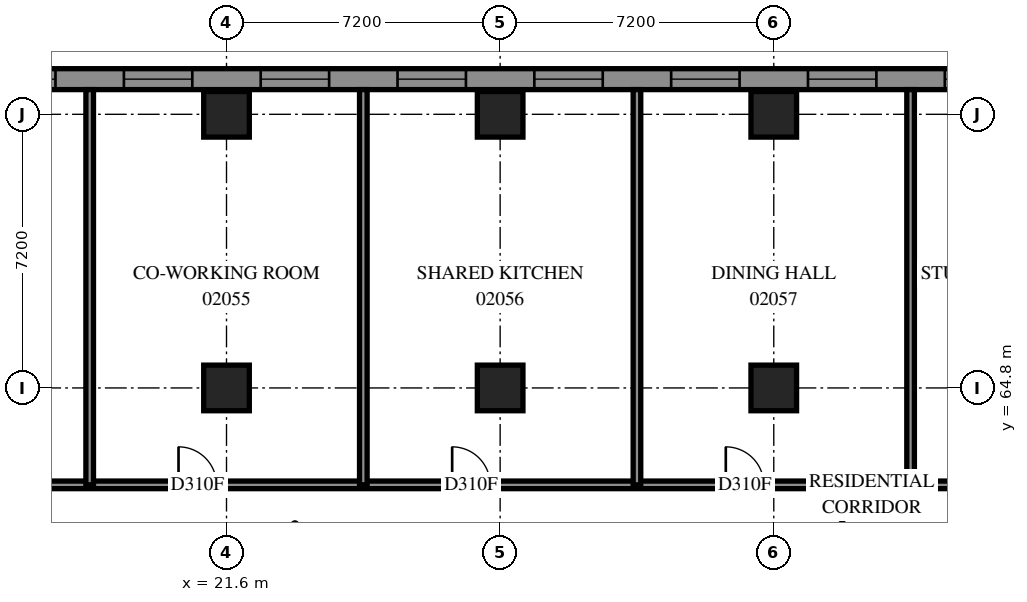
"""IFC4 building model, lengths in metres.
Left out: names, types, materials, properties, quantities, classifications, styles, units other than length and angle.
Written with IfcOpenShell. Run it as: python <this file> out.ifc"""

import sys

from ifc_helpers import new_model, si_unit, direction, frame, frame_2d, origin, origin_2d, place, context, subcontext, project, spatial, polyline, rectangle, outline, extrude, element, fill, save


model = new_model("IFC4")
c1 = context("Model", 3, precision=1e-05, world=origin(), true_north=direction((0.0, 1.0)))
c2 = subcontext(c1, "Body", "Model", "MODEL_VIEW")
j1 = project(units=[si_unit("LENGTHUNIT", "METRE"), si_unit("PLANEANGLEUNIT", "RADIAN")], contexts=[c1])
p1 = place(None, origin())
s1 = spatial("IfcSite", under=j1, at=p1, CompositionType="ELEMENT")
p2 = place(p1, origin())
s2 = spatial("IfcBuilding", under=s1, at=p2, CompositionType="ELEMENT")
p3 = place(p2, frame((0.0, 0.0, 10.2)))
s3 = spatial("IfcBuildingStorey", under=s2, at=p3, CompositionType="ELEMENT", Elevation=10.2)
for number, where, z_axis, x_axis in (
    (1, (21.6, 64.8, 0.0), (0.0, 0.0, 1.0), (1.0, 0.0, 0.0)),
    (2, (21.6, 72.0, 0.0), (0.0, 0.0, 1.0), (1.0, 0.0, 0.0)),
    (3, (28.8, 64.8, 0.0), (0.0, 0.0, 1.0), (1.0, 0.0, 0.0)),
    (4, (28.8, 72.0, 0.0), (0.0, 0.0, 1.0), (1.0, 0.0, 0.0)),
    (5, (36.0, 64.8, 0.0), (0.0, 0.0, 1.0), (1.0, 0.0, 0.0)),
    (6, (36.0, 72.0, 0.0), (0.0, 0.0, 1.0), (1.0, 0.0, 0.0)),
):
    element("IfcColumn", number, at=place(p3, frame(where, z_axis=z_axis, x_axis=x_axis)), inside=s3, PredefinedType="COLUMN", context=c2, shape_type="SweptSolid", body=[
        extrude(rectangle(XDim=1.2, YDim=1.2, at=origin_2d()), origin(), (0.0, 0.0, 1.0), 3.8),
    ])
p4 = place(p3, frame((79.583, 72.925, 0.0), z_axis=(0.0, 0.0, 1.0), x_axis=(-1.0, 0.0, 0.0)))
e7 = element("IfcWall", 7, at=p4, inside=s3, PredefinedType="SOLIDWALL", context=c2, shape_type="SweptSolid", body=[
    extrude(outline(polyline([(-0.114, -0.275), (79.583, -0.275), (79.033, 0.275), (0.114, 0.275), (-0.114, -0.275)])), origin(), (0.0, 0.0, 1.0), 3.8),
])
p5 = place(p4, frame((1.249, 0.0, 0.7)))
e8 = element("IfcOpeningElement", 8, at=p5, cuts=e7, PredefinedType="OPENING", context=c2, shape_type="SweptSolid", body=[
    extrude(rectangle(XDim=1.8, YDim=2.6, at=frame_2d((0.9, 1.3))), frame((0.0, 0.285, 0.0), z_axis=(0.0, -1.0, 0.0), x_axis=(1.0, 0.0, 0.0)), (0.0, 0.0, 1.0), 0.57),
])
p6 = place(p4, frame((4.883, 0.0, 0.7)))
e9 = element("IfcOpeningElement", 9, at=p6, cuts=e7, PredefinedType="OPENING", context=c2, shape_type="SweptSolid", body=[
    extrude(rectangle(XDim=1.8, YDim=2.6, at=frame_2d((0.9, 1.3))), frame((0.0, 0.285, 0.0), z_axis=(0.0, -1.0, 0.0), x_axis=(1.0, 0.0, 0.0)), (0.0, 0.0, 1.0), 0.57),
])
p7 = place(p4, frame((8.483, 0.0, 0.7)))
e10 = element("IfcOpeningElement", 10, at=p7, cuts=e7, PredefinedType="OPENING", context=c2, shape_type="SweptSolid", body=[
    extrude(rectangle(XDim=1.8, YDim=2.6, at=frame_2d((0.9, 1.3))), frame((0.0, 0.285, 0.0), z_axis=(0.0, -1.0, 0.0), x_axis=(1.0, 0.0, 0.0)), (0.0, 0.0, 1.0), 0.57),
])
p8 = place(p4, frame((12.083, 0.0, 0.7)))
e11 = element("IfcOpeningElement", 11, at=p8, cuts=e7, PredefinedType="OPENING", context=c2, shape_type="SweptSolid", body=[
    extrude(rectangle(XDim=1.8, YDim=2.6, at=frame_2d((0.9, 1.3))), frame((0.0, 0.285, 0.0), z_axis=(0.0, -1.0, 0.0), x_axis=(1.0, 0.0, 0.0)), (0.0, 0.0, 1.0), 0.57),
])
p9 = place(p4, frame((15.683, 0.0, 0.7)))
e12 = element("IfcOpeningElement", 12, at=p9, cuts=e7, PredefinedType="OPENING", context=c2, shape_type="SweptSolid", body=[
    extrude(rectangle(XDim=1.8, YDim=2.6, at=frame_2d((0.9, 1.3))), frame((0.0, 0.285, 0.0), z_axis=(0.0, -1.0, 0.0), x_axis=(1.0, 0.0, 0.0)), (0.0, 0.0, 1.0), 0.57),
])
p10 = place(p4, frame((19.283, 0.0, 0.7)))
e13 = element("IfcOpeningElement", 13, at=p10, cuts=e7, PredefinedType="OPENING", context=c2, shape_type="SweptSolid", body=[
    extrude(rectangle(XDim=1.8, YDim=2.6, at=frame_2d((0.9, 1.3))), frame((0.0, 0.285, 0.0), z_axis=(0.0, -1.0, 0.0), x_axis=(1.0, 0.0, 0.0)), (0.0, 0.0, 1.0), 0.57),
])
p11 = place(p4, frame((22.883, 0.0, 0.7)))
e14 = element("IfcOpeningElement", 14, at=p11, cuts=e7, PredefinedType="OPENING", context=c2, shape_type="SweptSolid", body=[
    extrude(rectangle(XDim=1.8, YDim=2.6, at=frame_2d((0.9, 1.3))), frame((0.0, 0.285, 0.0), z_axis=(0.0, -1.0, 0.0), x_axis=(1.0, 0.0, 0.0)), (0.0, 0.0, 1.0), 0.57),
])
p12 = place(p4, frame((26.483, 0.0, 0.7)))
e15 = element("IfcOpeningElement", 15, at=p12, cuts=e7, PredefinedType="OPENING", context=c2, shape_type="SweptSolid", body=[
    extrude(rectangle(XDim=1.8, YDim=2.6, at=frame_2d((0.9, 1.3))), frame((0.0, 0.285, 0.0), z_axis=(0.0, -1.0, 0.0), x_axis=(1.0, 0.0, 0.0)), (0.0, 0.0, 1.0), 0.57),
])
p13 = place(p4, frame((30.083, 0.0, 0.7)))
e16 = element("IfcOpeningElement", 16, at=p13, cuts=e7, PredefinedType="OPENING", context=c2, shape_type="SweptSolid", body=[
    extrude(rectangle(XDim=1.8, YDim=2.6, at=frame_2d((0.9, 1.3))), frame((0.0, 0.285, 0.0), z_axis=(0.0, -1.0, 0.0), x_axis=(1.0, 0.0, 0.0)), (0.0, 0.0, 1.0), 0.57),
])
p14 = place(p4, frame((33.683, 0.0, 0.7)))
e17 = element("IfcOpeningElement", 17, at=p14, cuts=e7, PredefinedType="OPENING", context=c2, shape_type="SweptSolid", body=[
    extrude(rectangle(XDim=1.8, YDim=2.6, at=frame_2d((0.9, 1.3))), frame((0.0, 0.285, 0.0), z_axis=(0.0, -1.0, 0.0), x_axis=(1.0, 0.0, 0.0)), (0.0, 0.0, 1.0), 0.57),
])
p15 = place(p4, frame((37.283, 0.0, 0.7)))
e18 = element("IfcOpeningElement", 18, at=p15, cuts=e7, PredefinedType="OPENING", context=c2, shape_type="SweptSolid", body=[
    extrude(rectangle(XDim=1.8, YDim=2.6, at=frame_2d((0.9, 1.3))), frame((0.0, 0.285, 0.0), z_axis=(0.0, -1.0, 0.0), x_axis=(1.0, 0.0, 0.0)), (0.0, 0.0, 1.0), 0.57),
])
p16 = place(p4, frame((40.883, 0.0, 0.7)))
e19 = element("IfcOpeningElement", 19, at=p16, cuts=e7, PredefinedType="OPENING", context=c2, shape_type="SweptSolid", body=[
    extrude(rectangle(XDim=1.8, YDim=2.6, at=frame_2d((0.9, 1.3))), frame((0.0, 0.285, 0.0), z_axis=(0.0, -1.0, 0.0), x_axis=(1.0, 0.0, 0.0)), (0.0, 0.0, 1.0), 0.57),
])
p17 = place(p4, frame((44.483, 0.0, 0.7)))
e20 = element("IfcOpeningElement", 20, at=p17, cuts=e7, PredefinedType="OPENING", context=c2, shape_type="SweptSolid", body=[
    extrude(rectangle(XDim=1.8, YDim=2.6, at=frame_2d((0.9, 1.3))), frame((0.0, 0.285, 0.0), z_axis=(0.0, -1.0, 0.0), x_axis=(1.0, 0.0, 0.0)), (0.0, 0.0, 1.0), 0.57),
])
p18 = place(p4, frame((48.083, 0.0, 0.7)))
e21 = element("IfcOpeningElement", 21, at=p18, cuts=e7, PredefinedType="OPENING", context=c2, shape_type="SweptSolid", body=[
    extrude(rectangle(XDim=1.8, YDim=2.6, at=frame_2d((0.9, 1.3))), frame((0.0, 0.285, 0.0), z_axis=(0.0, -1.0, 0.0), x_axis=(1.0, 0.0, 0.0)), (0.0, 0.0, 1.0), 0.57),
])
p19 = place(p4, frame((51.683, 0.0, 0.7)))
e22 = element("IfcOpeningElement", 22, at=p19, cuts=e7, PredefinedType="OPENING", context=c2, shape_type="SweptSolid", body=[
    extrude(rectangle(XDim=1.8, YDim=2.6, at=frame_2d((0.9, 1.3))), frame((0.0, 0.285, 0.0), z_axis=(0.0, -1.0, 0.0), x_axis=(1.0, 0.0, 0.0)), (0.0, 0.0, 1.0), 0.57),
])
p20 = place(p4, frame((55.283, 0.0, 0.7)))
e23 = element("IfcOpeningElement", 23, at=p20, cuts=e7, PredefinedType="OPENING", context=c2, shape_type="SweptSolid", body=[
    extrude(rectangle(XDim=1.8, YDim=2.6, at=frame_2d((0.9, 1.3))), frame((0.0, 0.285, 0.0), z_axis=(0.0, -1.0, 0.0), x_axis=(1.0, 0.0, 0.0)), (0.0, 0.0, 1.0), 0.57),
])
p21 = place(p4, frame((58.883, 0.0, 0.7)))
e24 = element("IfcOpeningElement", 24, at=p21, cuts=e7, PredefinedType="OPENING", context=c2, shape_type="SweptSolid", body=[
    extrude(rectangle(XDim=1.8, YDim=2.6, at=frame_2d((0.9, 1.3))), frame((0.0, 0.285, 0.0), z_axis=(0.0, -1.0, 0.0), x_axis=(1.0, 0.0, 0.0)), (0.0, 0.0, 1.0), 0.57),
])
p22 = place(p4, frame((62.483, 0.0, 0.7)))
e25 = element("IfcOpeningElement", 25, at=p22, cuts=e7, PredefinedType="OPENING", context=c2, shape_type="SweptSolid", body=[
    extrude(rectangle(XDim=1.8, YDim=2.6, at=frame_2d((0.9, 1.3))), frame((0.0, 0.285, 0.0), z_axis=(0.0, -1.0, 0.0), x_axis=(1.0, 0.0, 0.0)), (0.0, 0.0, 1.0), 0.57),
])
p23 = place(p4, frame((66.083, 0.0, 0.7)))
e26 = element("IfcOpeningElement", 26, at=p23, cuts=e7, PredefinedType="OPENING", context=c2, shape_type="SweptSolid", body=[
    extrude(rectangle(XDim=1.8, YDim=2.6, at=frame_2d((0.9, 1.3))), frame((0.0, 0.285, 0.0), z_axis=(0.0, -1.0, 0.0), x_axis=(1.0, 0.0, 0.0)), (0.0, 0.0, 1.0), 0.57),
])
p24 = place(p4, frame((69.683, 0.0, 0.7)))
e27 = element("IfcOpeningElement", 27, at=p24, cuts=e7, PredefinedType="OPENING", context=c2, shape_type="SweptSolid", body=[
    extrude(rectangle(XDim=1.8, YDim=2.6, at=frame_2d((0.9, 1.3))), frame((0.0, 0.285, 0.0), z_axis=(0.0, -1.0, 0.0), x_axis=(1.0, 0.0, 0.0)), (0.0, 0.0, 1.0), 0.57),
])
p25 = place(p4, frame((73.683, 0.0, 0.7)))
e28 = element("IfcOpeningElement", 28, at=p25, cuts=e7, PredefinedType="OPENING", context=c2, shape_type="SweptSolid", body=[
    extrude(rectangle(XDim=1.8, YDim=2.6, at=frame_2d((0.9, 1.3))), frame((0.0, 0.285, 0.0), z_axis=(0.0, -1.0, 0.0), x_axis=(1.0, 0.0, 0.0)), (0.0, 0.0, 1.0), 0.57),
])
p26 = place(p4, frame((76.508, 0.0, 0.7)))
e29 = element("IfcOpeningElement", 29, at=p26, cuts=e7, PredefinedType="OPENING", context=c2, shape_type="SweptSolid", body=[
    extrude(rectangle(XDim=1.8, YDim=2.6, at=frame_2d((0.9, 1.3))), frame((0.0, 0.285, 0.0), z_axis=(0.0, -1.0, 0.0), x_axis=(1.0, 0.0, 0.0)), (0.0, 0.0, 1.0), 0.57),
])
p27 = place(p3, frame((0.002, 62.25, 0.0), z_axis=(0.0, 0.0, 1.0), x_axis=(1.0, 0.0, 0.0)))
e30 = element("IfcWall", 30, at=p27, inside=s3, PredefinedType="PARTITIONING", context=c2, shape_type="SweptSolid", body=[
    extrude(rectangle(XDim=54.498, YDim=0.2, at=frame_2d((27.249, 0.0))), origin(), (0.0, 0.0, 1.0), 3.8),
])
p28 = place(p27, frame((8.667, 0.0, 0.0)))
e31 = element("IfcOpeningElement", 31, at=p28, cuts=e30, PredefinedType="OPENING", context=c2, shape_type="SweptSolid", body=[
    extrude(rectangle(XDim=1.0, YDim=2.1, at=frame_2d((0.5, 1.05))), frame((0.0, 0.11, 0.0), z_axis=(0.0, -1.0, 0.0), x_axis=(1.0, 0.0, 0.0)), (0.0, 0.0, 1.0), 0.22),
])
p29 = place(p27, frame((13.136, 0.0, 0.0)))
e32 = element("IfcOpeningElement", 32, at=p29, cuts=e30, PredefinedType="OPENING", context=c2, shape_type="SweptSolid", body=[
    extrude(rectangle(XDim=1.0, YDim=2.1, at=frame_2d((0.5, 1.05))), frame((0.0, 0.11, 0.0), z_axis=(0.0, -1.0, 0.0), x_axis=(1.0, 0.0, 0.0)), (0.0, 0.0, 1.0), 0.22),
])
p30 = place(p27, frame((20.335, 0.0, 0.0)))
e33 = element("IfcOpeningElement", 33, at=p30, cuts=e30, PredefinedType="OPENING", context=c2, shape_type="SweptSolid", body=[
    extrude(rectangle(XDim=1.0, YDim=2.1, at=frame_2d((0.5, 1.05))), frame((0.0, 0.11, 0.0), z_axis=(0.0, -1.0, 0.0), x_axis=(1.0, 0.0, 0.0)), (0.0, 0.0, 1.0), 0.22),
])
p31 = place(p27, frame((27.535, 0.0, 0.0)))
e34 = element("IfcOpeningElement", 34, at=p31, cuts=e30, PredefinedType="OPENING", context=c2, shape_type="SweptSolid", body=[
    extrude(rectangle(XDim=1.0, YDim=2.1, at=frame_2d((0.5, 1.05))), frame((0.0, 0.11, 0.0), z_axis=(0.0, -1.0, 0.0), x_axis=(1.0, 0.0, 0.0)), (0.0, 0.0, 1.0), 0.22),
])
p32 = place(p27, frame((34.736, 0.0, 0.0)))
e35 = element("IfcOpeningElement", 35, at=p32, cuts=e30, PredefinedType="OPENING", context=c2, shape_type="SweptSolid", body=[
    extrude(rectangle(XDim=1.0, YDim=2.1, at=frame_2d((0.5, 1.05))), frame((0.0, 0.11, 0.0), z_axis=(0.0, -1.0, 0.0), x_axis=(1.0, 0.0, 0.0)), (0.0, 0.0, 1.0), 0.22),
])
p33 = place(p27, frame((41.935, 0.0, 0.0)))
e36 = element("IfcOpeningElement", 36, at=p33, cuts=e30, PredefinedType="OPENING", context=c2, shape_type="SweptSolid", body=[
    extrude(rectangle(XDim=1.0, YDim=2.1, at=frame_2d((0.5, 1.05))), frame((0.0, 0.11, 0.0), z_axis=(0.0, -1.0, 0.0), x_axis=(1.0, 0.0, 0.0)), (0.0, 0.0, 1.0), 0.22),
])
p34 = place(p27, frame((49.136, 0.0, 0.0)))
e37 = element("IfcOpeningElement", 37, at=p34, cuts=e30, PredefinedType="OPENING", context=c2, shape_type="SweptSolid", body=[
    extrude(rectangle(XDim=1.0, YDim=2.1, at=frame_2d((0.5, 1.05))), frame((0.0, 0.11, 0.0), z_axis=(0.0, -1.0, 0.0), x_axis=(1.0, 0.0, 0.0)), (0.0, 0.0, 1.0), 0.22),
])
p35 = place(p27, frame((4.799, 0.0, 0.0)))
e38 = element("IfcOpeningElement", 38, at=p35, cuts=e30, PredefinedType="OPENING", context=c2, shape_type="SweptSolid", body=[
    extrude(rectangle(XDim=1.0, YDim=2.1, at=frame_2d((0.5, 1.05))), frame((0.0, 0.11, 0.0), z_axis=(0.0, -1.0, 0.0), x_axis=(1.0, 0.0, 0.0)), (0.0, 0.0, 1.0), 0.22),
])
for number, where, z_axis, x_axis in (
    (39, (18.0, 62.25, 0.0), (0.0, 0.0, 1.0), (0.0, 1.0, 0.0)),
    (40, (25.2, 62.25, 0.0), (0.0, 0.0, 1.0), (0.0, 1.0, 0.0)),
    (41, (32.4, 62.25, 0.0), (0.0, 0.0, 1.0), (0.0, 1.0, 0.0)),
    (42, (39.6, 62.25, 0.0), (0.0, 0.0, 1.0), (0.0, 1.0, 0.0)),
):
    element("IfcWall", number, at=place(p3, frame(where, z_axis=z_axis, x_axis=x_axis)), inside=s3, PredefinedType="PARTITIONING", context=c2, shape_type="SweptSolid", body=[
        extrude(rectangle(XDim=10.4, YDim=0.2, at=frame_2d((5.2, 0.0))), origin(), (0.0, 0.0, 1.0), 3.8),
    ])
p36 = place(p15, origin())
e43 = element("IfcWindow", 43, at=p36, inside=s3, PartitioningType="SINGLE_PANEL", PredefinedType="WINDOW", context=c2, shape_type="SweptSolid", body=[
    extrude(rectangle(XDim=1.8, YDim=2.6, at=frame_2d((0.9, 1.3))), frame((0.0, 0.155, 0.0), z_axis=(0.0, -1.0, 0.0), x_axis=(1.0, 0.0, 0.0)), (0.0, 0.0, 1.0), 0.06),
])
fill(e18, e43)
p37 = place(p16, origin())
e44 = element("IfcWindow", 44, at=p37, inside=s3, PartitioningType="SINGLE_PANEL", PredefinedType="WINDOW", context=c2, shape_type="SweptSolid", body=[
    extrude(rectangle(XDim=1.8, YDim=2.6, at=frame_2d((0.9, 1.3))), frame((0.0, 0.155, 0.0), z_axis=(0.0, -1.0, 0.0), x_axis=(1.0, 0.0, 0.0)), (0.0, 0.0, 1.0), 0.06),
])
fill(e19, e44)
p38 = place(p17, origin())
e45 = element("IfcWindow", 45, at=p38, inside=s3, PartitioningType="SINGLE_PANEL", PredefinedType="WINDOW", context=c2, shape_type="SweptSolid", body=[
    extrude(rectangle(XDim=1.8, YDim=2.6, at=frame_2d((0.9, 1.3))), frame((0.0, 0.155, 0.0), z_axis=(0.0, -1.0, 0.0), x_axis=(1.0, 0.0, 0.0)), (0.0, 0.0, 1.0), 0.06),
])
fill(e20, e45)
p39 = place(p18, origin())
e46 = element("IfcWindow", 46, at=p39, inside=s3, PartitioningType="SINGLE_PANEL", PredefinedType="WINDOW", context=c2, shape_type="SweptSolid", body=[
    extrude(rectangle(XDim=1.8, YDim=2.6, at=frame_2d((0.9, 1.3))), frame((0.0, 0.155, 0.0), z_axis=(0.0, -1.0, 0.0), x_axis=(1.0, 0.0, 0.0)), (0.0, 0.0, 1.0), 0.06),
])
fill(e21, e46)
p40 = place(p19, origin())
e47 = element("IfcWindow", 47, at=p40, inside=s3, PartitioningType="SINGLE_PANEL", PredefinedType="WINDOW", context=c2, shape_type="SweptSolid", body=[
    extrude(rectangle(XDim=1.8, YDim=2.6, at=frame_2d((0.9, 1.3))), frame((0.0, 0.155, 0.0), z_axis=(0.0, -1.0, 0.0), x_axis=(1.0, 0.0, 0.0)), (0.0, 0.0, 1.0), 0.06),
])
fill(e22, e47)
p41 = place(p20, origin())
e48 = element("IfcWindow", 48, at=p41, inside=s3, PartitioningType="SINGLE_PANEL", PredefinedType="WINDOW", context=c2, shape_type="SweptSolid", body=[
    extrude(rectangle(XDim=1.8, YDim=2.6, at=frame_2d((0.9, 1.3))), frame((0.0, 0.155, 0.0), z_axis=(0.0, -1.0, 0.0), x_axis=(1.0, 0.0, 0.0)), (0.0, 0.0, 1.0), 0.06),
])
fill(e23, e48)
p42 = place(p21, origin())
e49 = element("IfcWindow", 49, at=p42, inside=s3, PartitioningType="SINGLE_PANEL", PredefinedType="WINDOW", context=c2, shape_type="SweptSolid", body=[
    extrude(rectangle(XDim=1.8, YDim=2.6, at=frame_2d((0.9, 1.3))), frame((0.0, 0.155, 0.0), z_axis=(0.0, -1.0, 0.0), x_axis=(1.0, 0.0, 0.0)), (0.0, 0.0, 1.0), 0.06),
])
fill(e24, e49)
p43 = place(p22, origin())
e50 = element("IfcWindow", 50, at=p43, inside=s3, PartitioningType="SINGLE_PANEL", PredefinedType="WINDOW", context=c2, shape_type="SweptSolid", body=[
    extrude(rectangle(XDim=1.8, YDim=2.6, at=frame_2d((0.9, 1.3))), frame((0.0, 0.155, 0.0), z_axis=(0.0, -1.0, 0.0), x_axis=(1.0, 0.0, 0.0)), (0.0, 0.0, 1.0), 0.06),
])
fill(e25, e50)
p44 = place(p30, origin())
e51 = element("IfcDoor", 51, at=p44, inside=s3, OperationType="SINGLE_SWING_LEFT", PredefinedType="DOOR", context=c2, shape_type="SweptSolid", body=[
    extrude(rectangle(XDim=1.0, YDim=2.1, at=frame_2d((0.5, 1.05))), frame((0.0, 0.025, 0.0), z_axis=(0.0, -1.0, 0.0), x_axis=(1.0, 0.0, 0.0)), (0.0, 0.0, 1.0), 0.05),
])
fill(e33, e51)
p45 = place(p31, origin())
e52 = element("IfcDoor", 52, at=p45, inside=s3, OperationType="SINGLE_SWING_LEFT", PredefinedType="DOOR", context=c2, shape_type="SweptSolid", body=[
    extrude(rectangle(XDim=1.0, YDim=2.1, at=frame_2d((0.5, 1.05))), frame((0.0, 0.025, 0.0), z_axis=(0.0, -1.0, 0.0), x_axis=(1.0, 0.0, 0.0)), (0.0, 0.0, 1.0), 0.05),
])
fill(e34, e52)
p46 = place(p32, origin())
e53 = element("IfcDoor", 53, at=p46, inside=s3, OperationType="SINGLE_SWING_LEFT", PredefinedType="DOOR", context=c2, shape_type="SweptSolid", body=[
    extrude(rectangle(XDim=1.0, YDim=2.1, at=frame_2d((0.5, 1.05))), frame((0.0, 0.025, 0.0), z_axis=(0.0, -1.0, 0.0), x_axis=(1.0, 0.0, 0.0)), (0.0, 0.0, 1.0), 0.05),
])
fill(e35, e53)
save(model, sys.argv[1])
